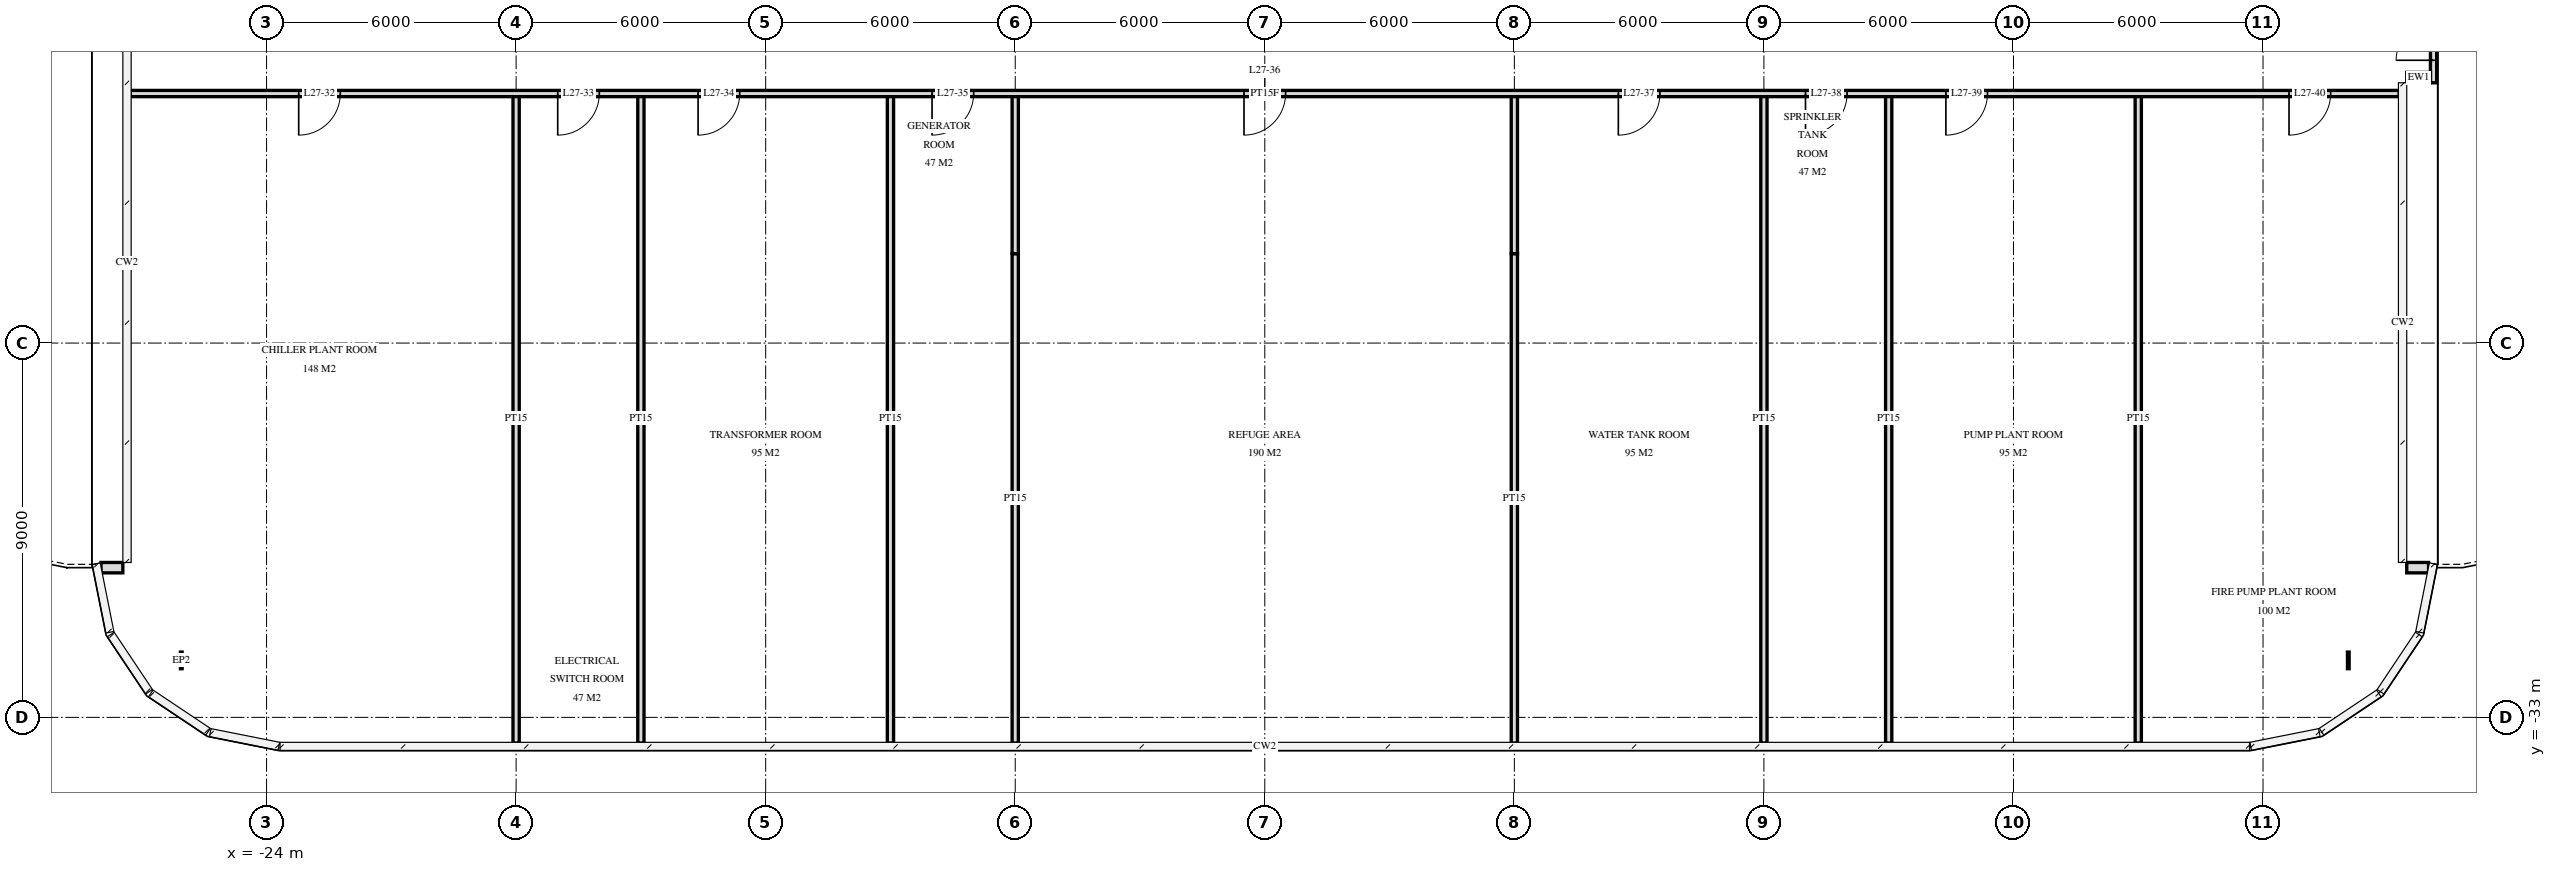
"""IFC4 building model, lengths in metres.
Left out: names, types, materials, properties, quantities, classifications, styles, units other than length and angle.
Written with IfcOpenShell. Run it as: python <this file> out.ifc"""

import sys

from ifc_helpers import new_model, si_unit, direction, frame, frame_2d, origin, place, context, subcontext, project, spatial, rectangle, extrude, element, fill, save


model = new_model("IFC4")
c1 = context("Model", 3, precision=1e-05, world=origin(), true_north=direction((0.0, 1.0)))
c2 = subcontext(c1, "Body", "Model", "MODEL_VIEW")
j1 = project(units=[si_unit("LENGTHUNIT", "METRE"), si_unit("PLANEANGLEUNIT", "RADIAN")], contexts=[c1])
p1 = place(None, origin())
s1 = spatial("IfcSite", under=j1, at=p1, CompositionType="ELEMENT")
p2 = place(p1, origin())
s2 = spatial("IfcBuilding", under=s1, at=p2, CompositionType="ELEMENT")
p3 = place(p2, frame((0.0, 0.0, 106.8)))
s3 = spatial("IfcBuildingStorey", under=s2, at=p3, CompositionType="ELEMENT", Elevation=106.8)
p4 = place(p3, frame((-27.455, -29.4, 0.0), z_axis=(0.0, 0.0, 1.0), x_axis=(-1.0, 0.0, 0.0)))
e1 = element("IfcWall", 1, at=p4, inside=s3, PredefinedType="SOLIDWALL", context=c2, shape_type="SweptSolid", body=[
    extrude(rectangle(XDim=0.525, YDim=0.25, at=frame_2d((0.262, 0.0))), origin(), (0.0, 0.0, 1.0), 5.72),
])
p5 = place(p3, frame((27.455, -17.617, 0.0), z_axis=(0.0, 0.0, 1.0), x_axis=(1.0, 0.0, 0.0)))
e2 = element("IfcWall", 2, at=p5, inside=s3, PredefinedType="SOLIDWALL", context=c2, shape_type="SweptSolid", body=[
    extrude(rectangle(XDim=0.57, YDim=0.25, at=frame_2d((0.285, 0.0))), origin(), (0.0, 0.0, 1.0), 5.72),
])
p6 = place(p3, frame((28.1, -17.742, 0.0), z_axis=(0.0, 0.0, 1.0), x_axis=(0.0, 1.0, 0.0)))
e3 = element("IfcWall", 3, at=p6, inside=s3, PredefinedType="USERDEFINED", context=c2, shape_type="SweptSolid", body=[
    extrude(rectangle(XDim=2.883, YDim=0.15, at=frame_2d((1.442, 0.0))), origin(), (0.0, 0.0, 1.0), 5.72),
])
p7 = place(p6, frame((0.542, 0.0, 0.0)))
e4 = element("IfcOpeningElement", 4, at=p7, cuts=e3, PredefinedType="OPENING", context=c2, shape_type="SweptSolid", body=[
    extrude(rectangle(XDim=1.8, YDim=2.4, at=frame_2d((0.9, 1.2))), frame((0.0, 0.085, 0.0), z_axis=(0.0, -1.0, 0.0), x_axis=(1.0, 0.0, 0.0)), (0.0, 0.0, 1.0), 0.17),
])
p8 = place(p3, frame((27.455, -29.4, 0.0), z_axis=(0.0, 0.0, 1.0), x_axis=(1.0, 0.0, 0.0)))
e5 = element("IfcWall", 5, at=p8, inside=s3, PredefinedType="SOLIDWALL", context=c2, shape_type="SweptSolid", body=[
    extrude(rectangle(XDim=0.525, YDim=0.25, at=frame_2d((0.262, 0.0))), origin(), (0.0, 0.0, 1.0), 5.72),
])
for number, where, z_axis, x_axis in (
    (6, (21.0, -33.62, 0.0), (0.0, 0.0, 1.0), (0.0, 1.0, 0.0)),
    (7, (15.0, -33.62, 0.0), (0.0, 0.0, 1.0), (0.0, 1.0, 0.0)),
):
    element("IfcWall", number, at=place(p3, frame(where, z_axis=z_axis, x_axis=x_axis)), inside=s3, PredefinedType="PARTITIONING", context=c2, shape_type="SweptSolid", body=[
        extrude(rectangle(XDim=15.62, YDim=0.15, at=frame_2d((7.81, 0.0))), origin(), (0.0, 0.0, 1.0), 5.7),
    ])
p9 = place(p3, frame((12.0, -33.62, 0.0), z_axis=(0.0, 0.0, 1.0), x_axis=(0.0, 1.0, 0.0)))
e8 = element("IfcWall", 8, at=p9, inside=s3, PredefinedType="PARTITIONING", context=c2, shape_type="SweptSolid", body=[
    extrude(rectangle(XDim=15.62, YDim=0.15, at=frame_2d((7.81, 0.0))), origin(), (0.0, 0.0, 1.0), 4.52),
])
for number, where, z_axis, x_axis in (
    (9, (6.0, -33.62, 0.0), (0.0, 0.0, 1.0), (0.0, 1.0, 0.0)),
    (10, (-6.0, -33.62, 0.0), (0.0, 0.0, 1.0), (0.0, 1.0, 0.0)),
):
    element("IfcWall", number, at=place(p3, frame(where, z_axis=z_axis, x_axis=x_axis)), inside=s3, PredefinedType="PARTITIONING", context=c2, shape_type="SweptSolid", body=[
        extrude(rectangle(XDim=11.77, YDim=0.15, at=frame_2d((5.885, 0.0))), origin(), (0.0, 0.0, 1.0), 4.52),
    ])
for number, where, z_axis, x_axis in (
    (11, (-9.0, -33.62, 0.0), (0.0, 0.0, 1.0), (0.0, 1.0, 0.0)),
    (12, (-15.0, -33.62, 0.0), (0.0, 0.0, 1.0), (0.0, 1.0, 0.0)),
):
    element("IfcWall", number, at=place(p3, frame(where, z_axis=z_axis, x_axis=x_axis)), inside=s3, PredefinedType="PARTITIONING", context=c2, shape_type="SweptSolid", body=[
        extrude(rectangle(XDim=15.62, YDim=0.15, at=frame_2d((7.81, 0.0))), origin(), (0.0, 0.0, 1.0), 5.7),
    ])
p10 = place(p3, frame((-18.0, -33.62, 0.0), z_axis=(0.0, 0.0, 1.0), x_axis=(0.0, 1.0, 0.0)))
e13 = element("IfcWall", 13, at=p10, inside=s3, PredefinedType="PARTITIONING", context=c2, shape_type="SweptSolid", body=[
    extrude(rectangle(XDim=15.62, YDim=0.15, at=frame_2d((7.81, 0.0))), origin(), (0.0, 0.0, 1.0), 4.52),
])
p11 = place(p3, frame((-27.275, -18.0, 0.0), z_axis=(0.0, 0.0, 1.0), x_axis=(1.0, 0.0, 0.0)))
e14 = element("IfcWall", 14, at=p11, inside=s3, PredefinedType="PARTITIONING", context=c2, shape_type="SweptSolid", body=[
    extrude(rectangle(XDim=54.55, YDim=0.15, at=frame_2d((27.275, 0.0))), origin(), (0.0, 0.0, 1.0), 5.7),
])
p12 = place(p11, frame((4.048, 0.0, 0.0)))
e15 = element("IfcOpeningElement", 15, at=p12, cuts=e14, PredefinedType="OPENING", context=c2, shape_type="SweptSolid", body=[
    extrude(rectangle(XDim=1.0, YDim=2.1, at=frame_2d((0.5, 1.05))), frame((0.0, 0.085, 0.0), z_axis=(0.0, -1.0, 0.0), x_axis=(1.0, 0.0, 0.0)), (0.0, 0.0, 1.0), 0.17),
])
p13 = place(p11, frame((10.275, 0.0, 0.0)))
e16 = element("IfcOpeningElement", 16, at=p13, cuts=e14, PredefinedType="OPENING", context=c2, shape_type="SweptSolid", body=[
    extrude(rectangle(XDim=1.0, YDim=2.1, at=frame_2d((0.5, 1.05))), frame((0.0, 0.085, 0.0), z_axis=(0.0, -1.0, 0.0), x_axis=(1.0, 0.0, 0.0)), (0.0, 0.0, 1.0), 0.17),
])
p14 = place(p11, frame((13.65, 0.0, 0.0)))
e17 = element("IfcOpeningElement", 17, at=p14, cuts=e14, PredefinedType="OPENING", context=c2, shape_type="SweptSolid", body=[
    extrude(rectangle(XDim=1.0, YDim=2.1, at=frame_2d((0.5, 1.05))), frame((0.0, 0.085, 0.0), z_axis=(0.0, -1.0, 0.0), x_axis=(1.0, 0.0, 0.0)), (0.0, 0.0, 1.0), 0.17),
])
p15 = place(p11, frame((19.275, 0.0, 0.0)))
e18 = element("IfcOpeningElement", 18, at=p15, cuts=e14, PredefinedType="OPENING", context=c2, shape_type="SweptSolid", body=[
    extrude(rectangle(XDim=1.0, YDim=2.1, at=frame_2d((0.5, 1.05))), frame((0.0, 0.085, 0.0), z_axis=(0.0, -1.0, 0.0), x_axis=(1.0, 0.0, 0.0)), (0.0, 0.0, 1.0), 0.17),
])
p16 = place(p11, frame((26.775, 0.0, 0.0)))
e19 = element("IfcOpeningElement", 19, at=p16, cuts=e14, PredefinedType="OPENING", context=c2, shape_type="SweptSolid", body=[
    extrude(rectangle(XDim=1.0, YDim=2.1, at=frame_2d((0.5, 1.05))), frame((0.0, 0.085, 0.0), z_axis=(0.0, -1.0, 0.0), x_axis=(1.0, 0.0, 0.0)), (0.0, 0.0, 1.0), 0.17),
])
p17 = place(p11, frame((35.775, 0.0, 0.0)))
e20 = element("IfcOpeningElement", 20, at=p17, cuts=e14, PredefinedType="OPENING", context=c2, shape_type="SweptSolid", body=[
    extrude(rectangle(XDim=1.0, YDim=2.1, at=frame_2d((0.5, 1.05))), frame((0.0, 0.085, 0.0), z_axis=(0.0, -1.0, 0.0), x_axis=(1.0, 0.0, 0.0)), (0.0, 0.0, 1.0), 0.17),
])
p18 = place(p11, frame((40.275, 0.0, 0.0)))
e21 = element("IfcOpeningElement", 21, at=p18, cuts=e14, PredefinedType="OPENING", context=c2, shape_type="SweptSolid", body=[
    extrude(rectangle(XDim=1.0, YDim=2.1, at=frame_2d((0.5, 1.05))), frame((0.0, 0.085, 0.0), z_axis=(0.0, -1.0, 0.0), x_axis=(1.0, 0.0, 0.0)), (0.0, 0.0, 1.0), 0.17),
])
p19 = place(p11, frame((43.65, 0.0, 0.0)))
e22 = element("IfcOpeningElement", 22, at=p19, cuts=e14, PredefinedType="OPENING", context=c2, shape_type="SweptSolid", body=[
    extrude(rectangle(XDim=1.0, YDim=2.1, at=frame_2d((0.5, 1.05))), frame((0.0, 0.085, 0.0), z_axis=(0.0, -1.0, 0.0), x_axis=(1.0, 0.0, 0.0)), (0.0, 0.0, 1.0), 0.17),
])
p20 = place(p11, frame((51.9, 0.0, 0.0)))
e23 = element("IfcOpeningElement", 23, at=p20, cuts=e14, PredefinedType="OPENING", context=c2, shape_type="SweptSolid", body=[
    extrude(rectangle(XDim=1.0, YDim=2.1, at=frame_2d((0.5, 1.05))), frame((0.0, 0.085, 0.0), z_axis=(0.0, -1.0, 0.0), x_axis=(1.0, 0.0, 0.0)), (0.0, 0.0, 1.0), 0.17),
])
for number, where, z_axis, x_axis in (
    (24, (6.0, -21.85, 0.0), (0.0, 0.0, 1.0), (0.0, 1.0, 0.0)),
    (25, (-6.0, -21.85, 0.0), (0.0, 0.0, 1.0), (0.0, 1.0, 0.0)),
):
    element("IfcWall", number, at=place(p3, frame(where, z_axis=z_axis, x_axis=x_axis)), inside=s3, PredefinedType="PARTITIONING", context=c2, shape_type="SweptSolid", body=[
        extrude(rectangle(XDim=3.85, YDim=0.15, at=frame_2d((1.925, 0.0))), origin(), (0.0, 0.0, 1.0), 5.7),
    ])
p21 = place(p7, origin())
e26 = element("IfcDoor", 26, at=p21, inside=s3, OperationType="DOUBLE_DOOR_SINGLE_SWING", PredefinedType="DOOR", context=c2, shape_type="SweptSolid", body=[
    extrude(rectangle(XDim=1.8, YDim=2.4, at=frame_2d((0.9, 1.2))), frame((0.0, 0.025, 0.0), z_axis=(0.0, -1.0, 0.0), x_axis=(1.0, 0.0, 0.0)), (0.0, 0.0, 1.0), 0.05),
])
fill(e4, e26)
p22 = place(p12, frame((0.5, 0.0, 0.0), z_axis=(0.0, 0.0, 1.0), x_axis=(-1.0, 0.0, 0.0)))
e27 = element("IfcDoor", 27, at=p22, inside=s3, OperationType="SINGLE_SWING_LEFT", PredefinedType="DOOR", context=c2, shape_type="SweptSolid", body=[
    extrude(rectangle(XDim=1.0, YDim=2.1, at=frame_2d((0.0, 1.05))), frame((0.0, -0.025, 0.0), z_axis=(0.0, 1.0, 0.0), x_axis=(-1.0, 0.0, 0.0)), (0.0, 0.0, 1.0), 0.05),
])
fill(e15, e27)
p23 = place(p13, frame((0.5, 0.0, 0.0), z_axis=(0.0, 0.0, 1.0), x_axis=(-1.0, 0.0, 0.0)))
e28 = element("IfcDoor", 28, at=p23, inside=s3, OperationType="SINGLE_SWING_LEFT", PredefinedType="DOOR", context=c2, shape_type="SweptSolid", body=[
    extrude(rectangle(XDim=1.0, YDim=2.1, at=frame_2d((0.0, 1.05))), frame((0.0, -0.025, 0.0), z_axis=(0.0, 1.0, 0.0), x_axis=(-1.0, 0.0, 0.0)), (0.0, 0.0, 1.0), 0.05),
])
fill(e16, e28)
p24 = place(p14, frame((0.5, 0.0, 0.0), z_axis=(0.0, 0.0, 1.0), x_axis=(-1.0, 0.0, 0.0)))
e29 = element("IfcDoor", 29, at=p24, inside=s3, OperationType="SINGLE_SWING_LEFT", PredefinedType="DOOR", context=c2, shape_type="SweptSolid", body=[
    extrude(rectangle(XDim=1.0, YDim=2.1, at=frame_2d((0.0, 1.05))), frame((0.0, -0.025, 0.0), z_axis=(0.0, 1.0, 0.0), x_axis=(-1.0, 0.0, 0.0)), (0.0, 0.0, 1.0), 0.05),
])
fill(e17, e29)
p25 = place(p15, frame((0.5, 0.0, 0.0), z_axis=(0.0, 0.0, 1.0), x_axis=(-1.0, 0.0, 0.0)))
e30 = element("IfcDoor", 30, at=p25, inside=s3, OperationType="SINGLE_SWING_LEFT", PredefinedType="DOOR", context=c2, shape_type="SweptSolid", body=[
    extrude(rectangle(XDim=1.0, YDim=2.1, at=frame_2d((0.0, 1.05))), frame((0.0, -0.025, 0.0), z_axis=(0.0, 1.0, 0.0), x_axis=(-1.0, 0.0, 0.0)), (0.0, 0.0, 1.0), 0.05),
])
fill(e18, e30)
p26 = place(p16, frame((0.5, 0.0, 0.0), z_axis=(0.0, 0.0, 1.0), x_axis=(-1.0, 0.0, 0.0)))
e31 = element("IfcDoor", 31, at=p26, inside=s3, OperationType="SINGLE_SWING_LEFT", PredefinedType="DOOR", context=c2, shape_type="SweptSolid", body=[
    extrude(rectangle(XDim=1.0, YDim=2.1, at=frame_2d((0.0, 1.05))), frame((0.0, -0.025, 0.0), z_axis=(0.0, 1.0, 0.0), x_axis=(-1.0, 0.0, 0.0)), (0.0, 0.0, 1.0), 0.05),
])
fill(e19, e31)
p27 = place(p17, frame((0.5, 0.0, 0.0), z_axis=(0.0, 0.0, 1.0), x_axis=(-1.0, 0.0, 0.0)))
e32 = element("IfcDoor", 32, at=p27, inside=s3, OperationType="SINGLE_SWING_LEFT", PredefinedType="DOOR", context=c2, shape_type="SweptSolid", body=[
    extrude(rectangle(XDim=1.0, YDim=2.1, at=frame_2d((0.0, 1.05))), frame((0.0, -0.025, 0.0), z_axis=(0.0, 1.0, 0.0), x_axis=(-1.0, 0.0, 0.0)), (0.0, 0.0, 1.0), 0.05),
])
fill(e20, e32)
p28 = place(p18, frame((0.5, 0.0, 0.0), z_axis=(0.0, 0.0, 1.0), x_axis=(-1.0, 0.0, 0.0)))
e33 = element("IfcDoor", 33, at=p28, inside=s3, OperationType="SINGLE_SWING_LEFT", PredefinedType="DOOR", context=c2, shape_type="SweptSolid", body=[
    extrude(rectangle(XDim=1.0, YDim=2.1, at=frame_2d((0.0, 1.05))), frame((0.0, -0.025, 0.0), z_axis=(0.0, 1.0, 0.0), x_axis=(-1.0, 0.0, 0.0)), (0.0, 0.0, 1.0), 0.05),
])
fill(e21, e33)
p29 = place(p19, frame((0.5, 0.0, 0.0), z_axis=(0.0, 0.0, 1.0), x_axis=(-1.0, 0.0, 0.0)))
e34 = element("IfcDoor", 34, at=p29, inside=s3, OperationType="SINGLE_SWING_LEFT", PredefinedType="DOOR", context=c2, shape_type="SweptSolid", body=[
    extrude(rectangle(XDim=1.0, YDim=2.1, at=frame_2d((0.0, 1.05))), frame((0.0, -0.025, 0.0), z_axis=(0.0, 1.0, 0.0), x_axis=(-1.0, 0.0, 0.0)), (0.0, 0.0, 1.0), 0.05),
])
fill(e22, e34)
p30 = place(p20, frame((0.5, 0.0, 0.0), z_axis=(0.0, 0.0, 1.0), x_axis=(-1.0, 0.0, 0.0)))
e35 = element("IfcDoor", 35, at=p30, inside=s3, OperationType="SINGLE_SWING_LEFT", PredefinedType="DOOR", context=c2, shape_type="SweptSolid", body=[
    extrude(rectangle(XDim=1.0, YDim=2.1, at=frame_2d((0.0, 1.05))), frame((0.0, -0.025, 0.0), z_axis=(0.0, 1.0, 0.0), x_axis=(-1.0, 0.0, 0.0)), (0.0, 0.0, 1.0), 0.05),
])
fill(e23, e35)
save(model, sys.argv[1])
